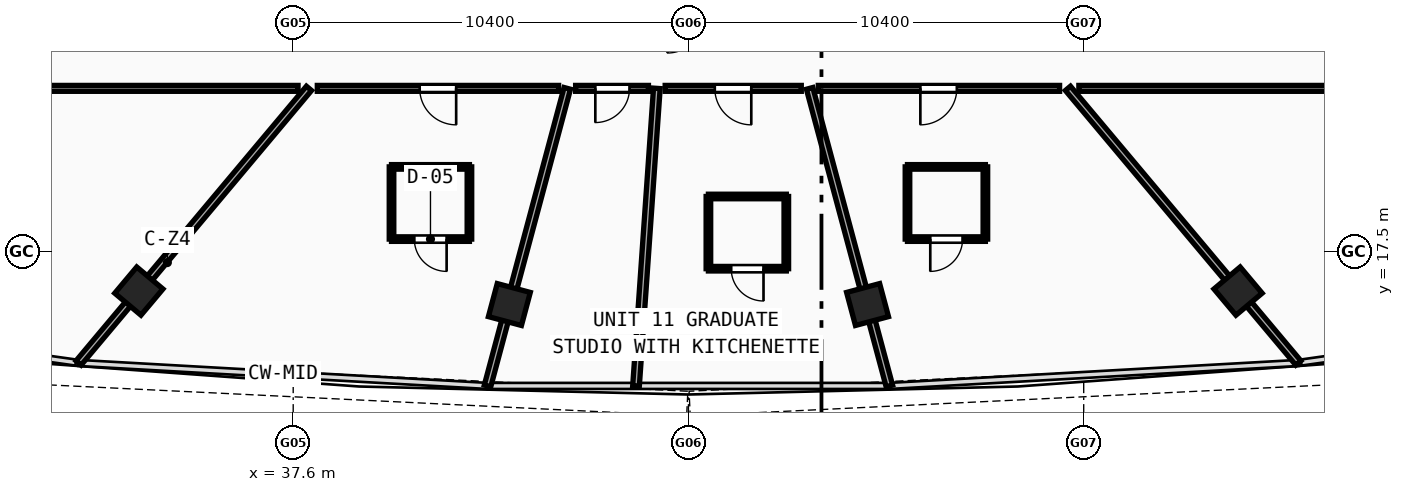
"""IFC4 building model, lengths in metres.
Left out: names, types, materials, properties, quantities, classifications, styles, units other than length and angle.
Written with IfcOpenShell. Run it as: python <this file> out.ifc"""

import sys

from ifc_helpers import new_model, si_unit, direction, frame, frame_2d, origin, origin_with_axes, origin_2d, place, context, subcontext, project, spatial, rectangle, hollow_rectangle, extrude, source, transform, mapped, element, fill, save


model = new_model("IFC4")
c1 = context("Model", 3, precision=1e-05, world=origin(), true_north=direction((0.0, 1.0)))
c2 = subcontext(c1, "Body", "Model", "MODEL_VIEW")
j1 = project(units=[si_unit("LENGTHUNIT", "METRE"), si_unit("PLANEANGLEUNIT", "RADIAN")], contexts=[c1])
p1 = place(None, origin())
s1 = spatial("IfcSite", under=j1, at=p1, CompositionType="ELEMENT")
p2 = place(p1, origin())
s2 = spatial("IfcBuilding", under=s1, at=p2, CompositionType="ELEMENT")
p3 = place(p2, frame((0.0, 0.0, 184.76)))
s3 = spatial("IfcBuildingStorey", under=s2, at=p3, CompositionType="ELEMENT", Elevation=184.76)
m1 = source(origin(), c2, "Body", "SweptSolid", [
    extrude(hollow_rectangle(XDim=0.9, YDim=0.9, WallThickness=0.036, at=origin_2d()), origin(), (0.0, 0.0, 1.0), 3.8),
])
for number, where, z_axis, x_axis in (
    (1, (33.539, 16.466, -0.26), (0.0, 0.0, 1.0), (0.766, -0.643, 0.0)),
    (2, (43.288, 16.112, -0.26), (0.0, 0.0, 1.0), (0.966, -0.259, 0.0)),
    (3, (52.713, 16.112, -0.26), (0.0, 0.0, 1.0), (0.966, 0.259, 0.0)),
    (4, (62.461, 16.466, -0.26), (0.0, 0.0, 1.0), (0.766, 0.643, 0.0)),
):
    element("IfcColumn", number, at=place(p3, frame(where, z_axis=z_axis, x_axis=x_axis)), inside=s3, PredefinedType="COLUMN", context=c2, shape_type="MappedRepresentation", body=[
        mapped(m1, transform((0.0, 0.0, 0.0), scale=1.0)),
    ])
p4 = place(p3, frame((38.015, 21.8, 0.0), z_axis=(0.0, 0.0, 1.0), x_axis=(-0.642777943688, -0.766052553751, 0.0)))
e5 = element("IfcWall", 5, at=p4, inside=s3, PredefinedType="PARTITIONING", context=c2, shape_type="SweptSolid", body=[
    extrude(rectangle(XDim=9.431, YDim=0.175, at=frame_2d((4.715, 0.0))), origin(), (0.0, 0.0, 1.0), 2.89),
])
p5 = place(p3, frame((44.811, 21.8, 0.0), z_axis=(0.0, 0.0, 1.0), x_axis=(-0.258815374981, -0.965926809688, 0.0)))
e6 = element("IfcWall", 6, at=p5, inside=s3, PredefinedType="PARTITIONING", context=c2, shape_type="SweptSolid", body=[
    extrude(rectangle(XDim=8.106, YDim=0.175, at=frame_2d((4.053, 0.0))), origin(), (0.0, 0.0, 1.0), 2.89),
])
p6 = place(p3, frame((47.168, 21.8, 0.0), z_axis=(0.0, 0.0, 1.0), x_axis=(-0.069770314737, -0.997563082307, 0.0)))
e7 = element("IfcWall", 7, at=p6, inside=s3, PredefinedType="PARTITIONING", context=c2, shape_type="SweptSolid", body=[
    extrude(rectangle(XDim=7.849, YDim=0.175, at=frame_2d((3.924, 0.0))), origin(), (0.0, 0.0, 1.0), 2.89),
])
p7 = place(p3, frame((51.189, 21.8, 0.0), z_axis=(0.0, 0.0, 1.0), x_axis=(0.258815374981, -0.965926809688, 0.0)))
e8 = element("IfcWall", 8, at=p7, inside=s3, PredefinedType="PARTITIONING", context=c2, shape_type="SweptSolid", body=[
    extrude(rectangle(XDim=8.106, YDim=0.175, at=frame_2d((4.053, 0.0))), origin(), (0.0, 0.0, 1.0), 2.89),
])
p8 = place(p3, frame((57.985, 21.8, 0.0), z_axis=(0.0, 0.0, 1.0), x_axis=(0.642777943688, -0.766052553751, 0.0)))
e9 = element("IfcWall", 9, at=p8, inside=s3, PredefinedType="PARTITIONING", context=c2, shape_type="SweptSolid", body=[
    extrude(rectangle(XDim=9.431, YDim=0.175, at=frame_2d((4.715, 0.0))), origin(), (0.0, 0.0, 1.0), 2.89),
])
p9 = place(p3, frame((66.4, 21.8, 0.0), z_axis=(0.0, 0.0, 1.0), x_axis=(-1.0, 0.0, 0.0)))
e10 = element("IfcWall", 10, at=p9, inside=s3, PredefinedType="PARTITIONING", context=c2, shape_type="SweptSolid", body=[
    extrude(rectangle(XDim=8.127, YDim=0.155, at=frame_2d((4.064, 0.0))), origin(), (0.0, 0.0, 1.0), 3.14),
])
p10 = place(p3, frame((57.765, 21.8, 0.0), z_axis=(0.0, 0.0, 1.0), x_axis=(-1.0, 0.0, 0.0)))
e11 = element("IfcWall", 11, at=p10, inside=s3, PredefinedType="PARTITIONING", context=c2, shape_type="SweptSolid", body=[
    extrude(rectangle(XDim=6.349, YDim=0.155, at=frame_2d((3.174, 0.0))), origin(), (0.0, 0.0, 1.0), 2.89),
])
p11 = place(p10, frame((2.703, 0.0, 0.0)))
e12 = element("IfcOpeningElement", 12, at=p11, cuts=e11, PredefinedType="OPENING", context=c2, shape_type="SweptSolid", body=[
    extrude(rectangle(XDim=0.96, YDim=2.12, at=frame_2d((0.48, 1.06))), frame((0.0, 0.087, 0.0), z_axis=(0.0, -1.0, 0.0), x_axis=(1.0, 0.0, 0.0)), (0.0, 0.0, 1.0), 0.175),
])
p12 = place(p3, frame((50.969, 21.8, 0.0), z_axis=(0.0, 0.0, 1.0), x_axis=(-1.0, 0.0, 0.0)))
e13 = element("IfcWall", 13, at=p12, inside=s3, PredefinedType="PARTITIONING", context=c2, shape_type="SweptSolid", body=[
    extrude(rectangle(XDim=3.581, YDim=0.155, at=frame_2d((1.791, 0.0))), origin(), (0.0, 0.0, 1.0), 3.54),
])
p13 = place(p12, frame((1.315, 0.0, 0.0)))
e14 = element("IfcOpeningElement", 14, at=p13, cuts=e13, PredefinedType="OPENING", context=c2, shape_type="SweptSolid", body=[
    extrude(rectangle(XDim=0.96, YDim=2.12, at=frame_2d((0.48, 1.06))), frame((0.0, 0.087, 0.0), z_axis=(0.0, -1.0, 0.0), x_axis=(1.0, 0.0, 0.0)), (0.0, 0.0, 1.0), 0.175),
])
p14 = place(p3, frame((46.948, 21.8, 0.0), z_axis=(0.0, 0.0, 1.0), x_axis=(-1.0, 0.0, 0.0)))
e15 = element("IfcWall", 15, at=p14, inside=s3, PredefinedType="PARTITIONING", context=c2, shape_type="SweptSolid", body=[
    extrude(rectangle(XDim=1.916, YDim=0.155, at=frame_2d((0.958, 0.0))), origin(), (0.0, 0.0, 1.0), 3.54),
])
p15 = place(p14, frame((0.498, 0.0, 0.0)))
e16 = element("IfcOpeningElement", 16, at=p15, cuts=e15, PredefinedType="OPENING", context=c2, shape_type="SweptSolid", body=[
    extrude(rectangle(XDim=0.9, YDim=2.08, at=frame_2d((0.45, 1.04))), frame((0.0, 0.087, 0.0), z_axis=(0.0, -1.0, 0.0), x_axis=(1.0, 0.0, 0.0)), (0.0, 0.0, 1.0), 0.175),
])
p16 = place(p3, frame((44.583, 21.8, 0.0), z_axis=(0.0, 0.0, 1.0), x_axis=(-1.0, 0.0, 0.0)))
e17 = element("IfcWall", 17, at=p16, inside=s3, PredefinedType="PARTITIONING", context=c2, shape_type="SweptSolid", body=[
    extrude(rectangle(XDim=6.349, YDim=0.155, at=frame_2d((3.174, 0.0))), origin(), (0.0, 0.0, 1.0), 2.89),
])
p17 = place(p16, frame((2.696, 0.0, 0.0)))
e18 = element("IfcOpeningElement", 18, at=p17, cuts=e17, PredefinedType="OPENING", context=c2, shape_type="SweptSolid", body=[
    extrude(rectangle(XDim=0.96, YDim=2.12, at=frame_2d((0.48, 1.06))), frame((0.0, 0.087, 0.0), z_axis=(0.0, -1.0, 0.0), x_axis=(1.0, 0.0, 0.0)), (0.0, 0.0, 1.0), 0.175),
])
p18 = place(p3, frame((37.728, 21.8, 0.0), z_axis=(0.0, 0.0, 1.0), x_axis=(-1.0, 0.0, 0.0)))
e19 = element("IfcWall", 19, at=p18, inside=s3, PredefinedType="PARTITIONING", context=c2, shape_type="SweptSolid", body=[
    extrude(rectangle(XDim=8.127, YDim=0.155, at=frame_2d((4.064, 0.0))), origin(), (0.0, 0.0, 1.0), 3.14),
])
p19 = place(p3, frame((40.187, 17.834, 0.0), z_axis=(0.0, 0.0, 1.0), x_axis=(1.0, 0.0, 0.0)))
e20 = element("IfcWall", 20, at=p19, inside=s3, PredefinedType="PARTITIONING", context=c2, shape_type="SweptSolid", body=[
    extrude(rectangle(XDim=2.05, YDim=0.12, at=frame_2d((1.025, 0.0))), origin(), (0.0, 0.0, 1.0), 3.54),
])
p20 = place(p19, frame((0.6, 0.0, 0.0)))
e21 = element("IfcOpeningElement", 21, at=p20, cuts=e20, PredefinedType="OPENING", context=c2, shape_type="SweptSolid", body=[
    extrude(rectangle(XDim=0.85, YDim=2.1, at=frame_2d((0.425, 1.05))), frame((0.0, 0.07, 0.0), z_axis=(0.0, -1.0, 0.0), x_axis=(1.0, 0.0, 0.0)), (0.0, 0.0, 1.0), 0.14),
])
p21 = place(p3, frame((42.237, 17.834, 0.0), z_axis=(0.0, 0.0, 1.0), x_axis=(0.0, 1.0, 0.0)))
e22 = element("IfcWall", 22, at=p21, inside=s3, PredefinedType="PARTITIONING", context=c2, shape_type="SweptSolid", body=[
    extrude(rectangle(XDim=1.9, YDim=0.12, at=frame_2d((0.95, 0.0))), origin(), (0.0, 0.0, 1.0), 3.14),
])
p22 = place(p3, frame((42.237, 19.734, 0.0), z_axis=(0.0, 0.0, 1.0), x_axis=(-1.0, 0.0, 0.0)))
e23 = element("IfcWall", 23, at=p22, inside=s3, PredefinedType="PARTITIONING", context=c2, shape_type="SweptSolid", body=[
    extrude(rectangle(XDim=2.05, YDim=0.12, at=frame_2d((1.025, 0.0))), origin(), (0.0, 0.0, 1.0), 3.14),
])
p23 = place(p3, frame((40.187, 19.734, 0.0), z_axis=(0.0, 0.0, 1.0), x_axis=(0.0, -1.0, 0.0)))
e24 = element("IfcWall", 24, at=p23, inside=s3, PredefinedType="PARTITIONING", context=c2, shape_type="SweptSolid", body=[
    extrude(rectangle(XDim=1.9, YDim=0.12, at=frame_2d((0.95, 0.0))), origin(), (0.0, 0.0, 1.0), 3.14),
])
p24 = place(p3, frame((48.525, 17.055, 0.0), z_axis=(0.0, 0.0, 1.0), x_axis=(1.0, 0.0, 0.0)))
e25 = element("IfcWall", 25, at=p24, inside=s3, PredefinedType="PARTITIONING", context=c2, shape_type="SweptSolid", body=[
    extrude(rectangle(XDim=2.05, YDim=0.12, at=frame_2d((1.025, 0.0))), origin(), (0.0, 0.0, 1.0), 3.54),
])
p25 = place(p24, frame((0.6, 0.0, 0.0)))
e26 = element("IfcOpeningElement", 26, at=p25, cuts=e25, PredefinedType="OPENING", context=c2, shape_type="SweptSolid", body=[
    extrude(rectangle(XDim=0.85, YDim=2.1, at=frame_2d((0.425, 1.05))), frame((0.0, 0.07, 0.0), z_axis=(0.0, -1.0, 0.0), x_axis=(1.0, 0.0, 0.0)), (0.0, 0.0, 1.0), 0.14),
])
p26 = place(p3, frame((50.575, 17.055, 0.0), z_axis=(0.0, 0.0, 1.0), x_axis=(0.0, 1.0, 0.0)))
e27 = element("IfcWall", 27, at=p26, inside=s3, PredefinedType="PARTITIONING", context=c2, shape_type="SweptSolid", body=[
    extrude(rectangle(XDim=1.9, YDim=0.12, at=frame_2d((0.95, 0.0))), origin(), (0.0, 0.0, 1.0), 3.54),
])
p27 = place(p3, frame((50.575, 18.955, 0.0), z_axis=(0.0, 0.0, 1.0), x_axis=(-1.0, 0.0, 0.0)))
e28 = element("IfcWall", 28, at=p27, inside=s3, PredefinedType="PARTITIONING", context=c2, shape_type="SweptSolid", body=[
    extrude(rectangle(XDim=2.05, YDim=0.12, at=frame_2d((1.025, 0.0))), origin(), (0.0, 0.0, 1.0), 3.54),
])
p28 = place(p3, frame((48.525, 18.955, 0.0), z_axis=(0.0, 0.0, 1.0), x_axis=(0.0, -1.0, 0.0)))
e29 = element("IfcWall", 29, at=p28, inside=s3, PredefinedType="PARTITIONING", context=c2, shape_type="SweptSolid", body=[
    extrude(rectangle(XDim=1.9, YDim=0.12, at=frame_2d((0.95, 0.0))), origin(), (0.0, 0.0, 1.0), 3.54),
])
p29 = place(p3, frame((53.763, 17.834, 0.0), z_axis=(0.0, 0.0, 1.0), x_axis=(1.0, 0.0, 0.0)))
e30 = element("IfcWall", 30, at=p29, inside=s3, PredefinedType="PARTITIONING", context=c2, shape_type="SweptSolid", body=[
    extrude(rectangle(XDim=2.05, YDim=0.12, at=frame_2d((1.025, 0.0))), origin(), (0.0, 0.0, 1.0), 3.54),
])
p30 = place(p29, frame((0.6, 0.0, 0.0)))
e31 = element("IfcOpeningElement", 31, at=p30, cuts=e30, PredefinedType="OPENING", context=c2, shape_type="SweptSolid", body=[
    extrude(rectangle(XDim=0.85, YDim=2.1, at=frame_2d((0.425, 1.05))), frame((0.0, 0.07, 0.0), z_axis=(0.0, -1.0, 0.0), x_axis=(1.0, 0.0, 0.0)), (0.0, 0.0, 1.0), 0.14),
])
p31 = place(p3, frame((55.813, 17.834, 0.0), z_axis=(0.0, 0.0, 1.0), x_axis=(0.0, 1.0, 0.0)))
e32 = element("IfcWall", 32, at=p31, inside=s3, PredefinedType="PARTITIONING", context=c2, shape_type="SweptSolid", body=[
    extrude(rectangle(XDim=1.9, YDim=0.12, at=frame_2d((0.95, 0.0))), origin(), (0.0, 0.0, 1.0), 3.14),
])
p32 = place(p3, frame((55.813, 19.734, 0.0), z_axis=(0.0, 0.0, 1.0), x_axis=(-1.0, 0.0, 0.0)))
e33 = element("IfcWall", 33, at=p32, inside=s3, PredefinedType="PARTITIONING", context=c2, shape_type="SweptSolid", body=[
    extrude(rectangle(XDim=2.05, YDim=0.12, at=frame_2d((1.025, 0.0))), origin(), (0.0, 0.0, 1.0), 3.14),
])
p33 = place(p3, frame((53.763, 19.734, 0.0), z_axis=(0.0, 0.0, 1.0), x_axis=(0.0, -1.0, 0.0)))
e34 = element("IfcWall", 34, at=p33, inside=s3, PredefinedType="PARTITIONING", context=c2, shape_type="SweptSolid", body=[
    extrude(rectangle(XDim=1.9, YDim=0.12, at=frame_2d((0.95, 0.0))), origin(), (0.0, 0.0, 1.0), 3.14),
])
m2 = source(origin(), c2, "Body", "SweptSolid", [
    extrude(rectangle(XDim=0.96, YDim=2.12, at=frame_2d((0.48, 1.06))), frame((0.0, 0.025, 0.0), z_axis=(0.0, -1.0, 0.0), x_axis=(1.0, 0.0, 0.0)), (0.0, 0.0, 1.0), 0.05),
])
p34 = place(p17, origin_with_axes())
e35 = element("IfcDoor", 35, at=p34, inside=s3, OperationType="SINGLE_SWING_LEFT", PredefinedType="DOOR", context=c2, shape_type="MappedRepresentation", body=[
    mapped(m2, transform((0.0, 0.0, 0.0), scale=1.0)),
])
fill(e18, e35)
m3 = source(origin(), c2, "Body", "SweptSolid", [
    extrude(rectangle(XDim=0.85, YDim=2.1, at=frame_2d((0.425, 1.05))), frame((0.0, 0.025, 0.0), z_axis=(0.0, -1.0, 0.0), x_axis=(1.0, 0.0, 0.0)), (0.0, 0.0, 1.0), 0.05),
])
p35 = place(p20, frame((0.85, 0.0, 0.0), z_axis=(0.0, 0.0, 1.0), x_axis=(-1.0, 0.0, 0.0)))
e36 = element("IfcDoor", 36, at=p35, inside=s3, OperationType="SINGLE_SWING_LEFT", PredefinedType="DOOR", context=c2, shape_type="MappedRepresentation", body=[
    mapped(m3, transform((0.0, 0.0, 0.0), scale=1.0)),
])
fill(e21, e36)
m4 = source(origin(), c2, "Body", "SweptSolid", [
    extrude(rectangle(XDim=0.9, YDim=2.08, at=frame_2d((0.45, 1.04))), frame((0.0, 0.025, 0.0), z_axis=(0.0, -1.0, 0.0), x_axis=(1.0, 0.0, 0.0)), (0.0, 0.0, 1.0), 0.05),
])
p36 = place(p15, origin_with_axes())
e37 = element("IfcDoor", 37, at=p36, inside=s3, OperationType="SINGLE_SWING_RIGHT", PredefinedType="DOOR", context=c2, shape_type="MappedRepresentation", body=[
    mapped(m4, transform((0.0, 0.0, 0.0), scale=1.0)),
])
fill(e16, e37)
p37 = place(p13, origin_with_axes())
e38 = element("IfcDoor", 38, at=p37, inside=s3, OperationType="SINGLE_SWING_LEFT", PredefinedType="DOOR", context=c2, shape_type="MappedRepresentation", body=[
    mapped(m2, transform((0.0, 0.0, 0.0), scale=1.0)),
])
fill(e14, e38)
p38 = place(p25, frame((0.85, 0.0, 0.0), z_axis=(0.0, 0.0, 1.0), x_axis=(-1.0, 0.0, 0.0)))
e39 = element("IfcDoor", 39, at=p38, inside=s3, OperationType="SINGLE_SWING_LEFT", PredefinedType="DOOR", context=c2, shape_type="MappedRepresentation", body=[
    mapped(m3, transform((0.0, 0.0, 0.0), scale=1.0)),
])
fill(e26, e39)
p39 = place(p11, origin_with_axes())
e40 = element("IfcDoor", 40, at=p39, inside=s3, OperationType="SINGLE_SWING_RIGHT", PredefinedType="DOOR", context=c2, shape_type="MappedRepresentation", body=[
    mapped(m2, transform((0.0, 0.0, 0.0), scale=1.0)),
])
fill(e12, e40)
p40 = place(p30, frame((0.85, 0.0, 0.0), z_axis=(0.0, 0.0, 1.0), x_axis=(-1.0, 0.0, 0.0)))
e41 = element("IfcDoor", 41, at=p40, inside=s3, OperationType="SINGLE_SWING_RIGHT", PredefinedType="DOOR", context=c2, shape_type="MappedRepresentation", body=[
    mapped(m3, transform((0.0, 0.0, 0.0), scale=1.0)),
])
fill(e31, e41)
save(model, sys.argv[1])
